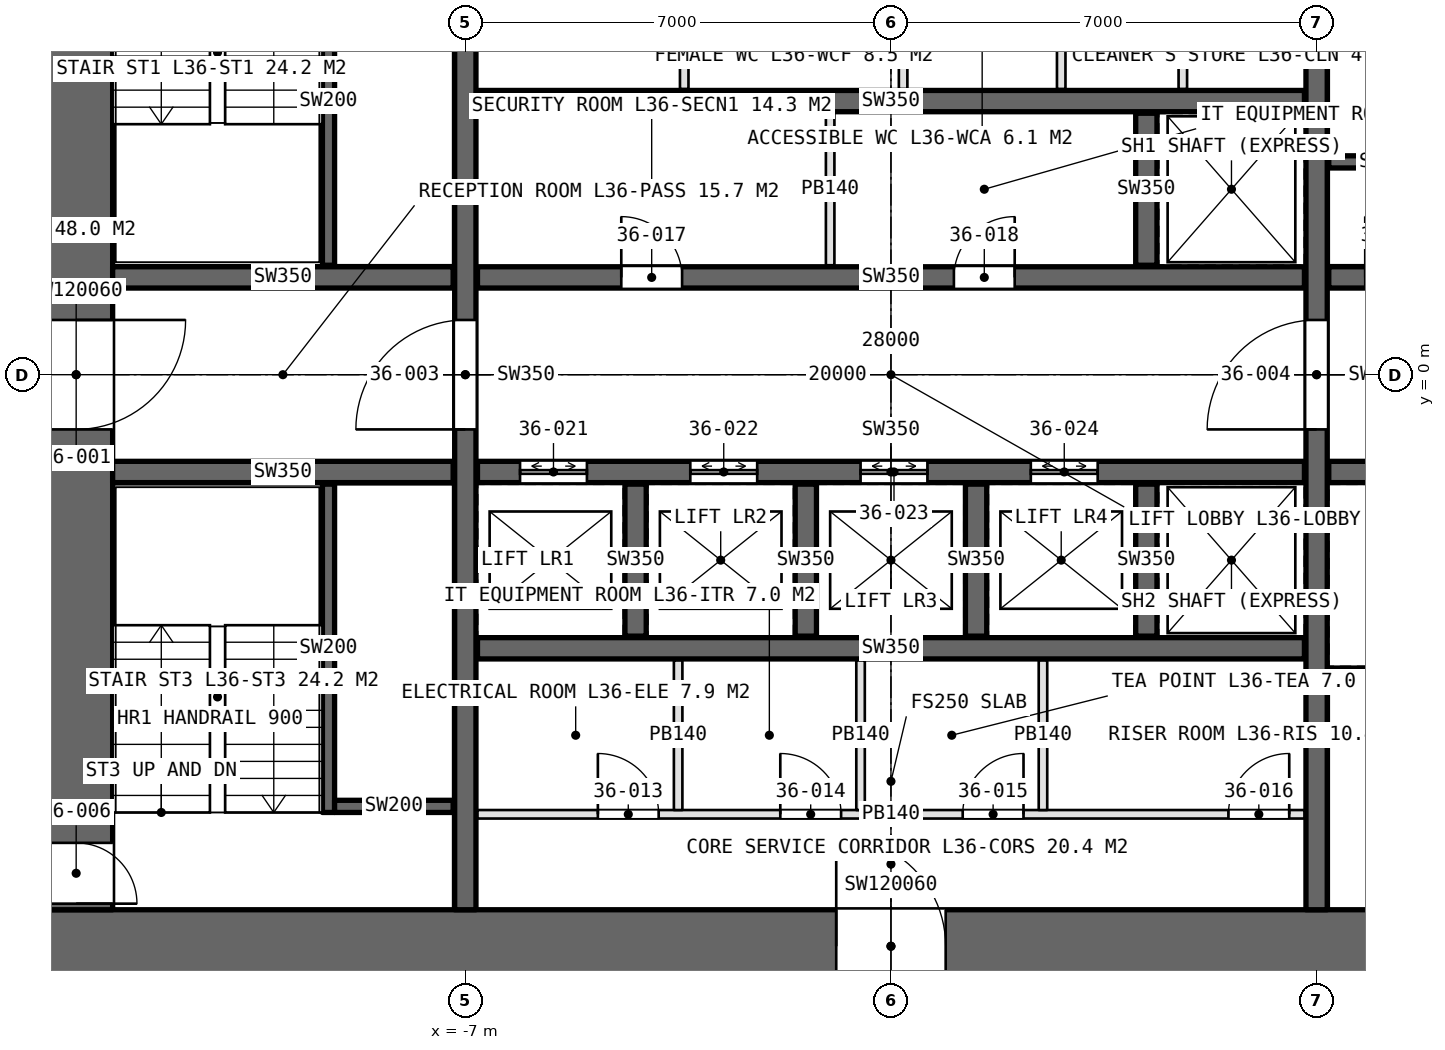
"""IFC4 building model, lengths in metres.
Left out: names, types, materials, properties, quantities, classifications, styles, units other than length and angle.
Written with IfcOpenShell. Run it as: python <this file> out.ifc"""

import sys

from ifc_helpers import new_model, si_unit, direction, frame, frame_2d, origin, place, context, subcontext, project, spatial, rectangle, extrude, element, fill, save


model = new_model("IFC4")
c1 = context("Model", 3, precision=1e-05, world=origin(), true_north=direction((0.0, 1.0)))
c2 = subcontext(c1, "Body", "Model", "MODEL_VIEW")
j1 = project(units=[si_unit("LENGTHUNIT", "METRE"), si_unit("PLANEANGLEUNIT", "RADIAN")], contexts=[c1])
p1 = place(None, origin())
s1 = spatial("IfcSite", under=j1, at=p1, CompositionType="ELEMENT")
p2 = place(p1, origin())
s2 = spatial("IfcBuilding", under=s1, at=p2, CompositionType="ELEMENT")
p3 = place(p2, frame((0.0, 0.0, 168.0)))
s3 = spatial("IfcBuildingStorey", under=s2, at=p3, CompositionType="ELEMENT", Elevation=168.0)
p4 = place(p3, frame((-14.0, -9.4, 0.0), z_axis=(0.0, 0.0, 1.0), x_axis=(1.0, 0.0, 0.0)))
e1 = element("IfcWall", 1, at=p4, inside=s3, PredefinedType="SHEAR", context=c2, shape_type="SweptSolid", body=[
    extrude(rectangle(XDim=28.0, YDim=1.2, at=frame_2d((14.0, 0.0))), origin(), (0.0, 0.0, 1.0), 4.2),
])
p5 = place(p4, frame((13.1, 0.0, 0.0)))
e2 = element("IfcOpeningElement", 2, at=p5, cuts=e1, PredefinedType="OPENING", context=c2, shape_type="SweptSolid", body=[
    extrude(rectangle(XDim=1.8, YDim=2.4, at=frame_2d((0.9, 1.2))), frame((0.0, 0.61, 0.0), z_axis=(0.0, -1.0, 0.0), x_axis=(1.0, 0.0, 0.0)), (0.0, 0.0, 1.0), 1.22),
])
p6 = place(p4, frame((22.9, 0.0, 0.0)))
e3 = element("IfcOpeningElement", 3, at=p6, cuts=e1, PredefinedType="OPENING", context=c2, shape_type="SweptSolid", body=[
    extrude(rectangle(XDim=2.2, YDim=2.7, at=frame_2d((1.1, 1.35))), frame((0.0, 0.61, 0.0), z_axis=(0.0, -1.0, 0.0), x_axis=(1.0, 0.0, 0.0)), (0.0, 0.0, 1.0), 1.22),
])
p7 = place(p3, frame((-13.4, 8.8, 0.0), z_axis=(0.0, 0.0, 1.0), x_axis=(0.0, -1.0, 0.0)))
e4 = element("IfcWall", 4, at=p7, inside=s3, PredefinedType="SHEAR", context=c2, shape_type="SweptSolid", body=[
    extrude(rectangle(XDim=17.6, YDim=1.2, at=frame_2d((8.8, 0.0))), origin(), (0.0, 0.0, 1.0), 4.2),
])
p8 = place(p7, frame((7.9, 0.0, 0.0)))
e5 = element("IfcOpeningElement", 5, at=p8, cuts=e4, PredefinedType="OPENING", context=c2, shape_type="SweptSolid", body=[
    extrude(rectangle(XDim=1.8, YDim=2.4, at=frame_2d((0.9, 1.2))), frame((0.0, 0.61, 0.0), z_axis=(0.0, -1.0, 0.0), x_axis=(1.0, 0.0, 0.0)), (0.0, 0.0, 1.0), 1.22),
])
p9 = place(p7, frame((16.5, 0.0, 0.0)))
e6 = element("IfcOpeningElement", 6, at=p9, cuts=e4, PredefinedType="OPENING", context=c2, shape_type="SweptSolid", body=[
    extrude(rectangle(XDim=1.0, YDim=2.4, at=frame_2d((0.5, 1.2))), frame((0.0, 0.61, 0.0), z_axis=(0.0, -1.0, 0.0), x_axis=(1.0, 0.0, 0.0)), (0.0, 0.0, 1.0), 1.22),
])
p10 = place(p3, frame((-7.0, -8.8, 0.0), z_axis=(0.0, 0.0, 1.0), x_axis=(0.0, 1.0, 0.0)))
e7 = element("IfcWall", 7, at=p10, inside=s3, PredefinedType="SHEAR", context=c2, shape_type="SweptSolid", body=[
    extrude(rectangle(XDim=17.6, YDim=0.35, at=frame_2d((8.8, 0.0))), origin(), (0.0, 0.0, 1.0), 4.2),
])
p11 = place(p10, frame((7.9, 0.0, 0.0)))
e8 = element("IfcOpeningElement", 8, at=p11, cuts=e7, PredefinedType="OPENING", context=c2, shape_type="SweptSolid", body=[
    extrude(rectangle(XDim=1.8, YDim=2.4, at=frame_2d((0.9, 1.2))), frame((0.0, 0.185, 0.0), z_axis=(0.0, -1.0, 0.0), x_axis=(1.0, 0.0, 0.0)), (0.0, 0.0, 1.0), 0.37),
])
p12 = place(p3, frame((7.0, -8.8, 0.0), z_axis=(0.0, 0.0, 1.0), x_axis=(0.0, 1.0, 0.0)))
e9 = element("IfcWall", 9, at=p12, inside=s3, PredefinedType="SHEAR", context=c2, shape_type="SweptSolid", body=[
    extrude(rectangle(XDim=17.6, YDim=0.35, at=frame_2d((8.8, 0.0))), origin(), (0.0, 0.0, 1.0), 4.2),
])
p13 = place(p12, frame((7.9, 0.0, 0.0)))
e10 = element("IfcOpeningElement", 10, at=p13, cuts=e9, PredefinedType="OPENING", context=c2, shape_type="SweptSolid", body=[
    extrude(rectangle(XDim=1.8, YDim=2.4, at=frame_2d((0.9, 1.2))), frame((0.0, 0.185, 0.0), z_axis=(0.0, -1.0, 0.0), x_axis=(1.0, 0.0, 0.0)), (0.0, 0.0, 1.0), 0.37),
])
p14 = place(p3, frame((-6.8, 1.6, 0.0), z_axis=(0.0, 0.0, 1.0), x_axis=(1.0, 0.0, 0.0)))
e11 = element("IfcWall", 11, at=p14, inside=s3, PredefinedType="SHEAR", context=c2, shape_type="SweptSolid", body=[
    extrude(rectangle(XDim=13.6, YDim=0.35, at=frame_2d((6.8, 0.0))), origin(), (0.0, 0.0, 1.0), 4.2),
])
p15 = place(p14, frame((2.365, 0.0, 0.0)))
e12 = element("IfcOpeningElement", 12, at=p15, cuts=e11, PredefinedType="OPENING", context=c2, shape_type="SweptSolid", body=[
    extrude(rectangle(XDim=1.0, YDim=2.4, at=frame_2d((0.5, 1.2))), frame((0.0, 0.185, 0.0), z_axis=(0.0, -1.0, 0.0), x_axis=(1.0, 0.0, 0.0)), (0.0, 0.0, 1.0), 0.37),
])
p16 = place(p14, frame((7.835, 0.0, 0.0)))
e13 = element("IfcOpeningElement", 13, at=p16, cuts=e11, PredefinedType="OPENING", context=c2, shape_type="SweptSolid", body=[
    extrude(rectangle(XDim=1.0, YDim=2.4, at=frame_2d((0.5, 1.2))), frame((0.0, 0.185, 0.0), z_axis=(0.0, -1.0, 0.0), x_axis=(1.0, 0.0, 0.0)), (0.0, 0.0, 1.0), 0.37),
])
p17 = place(p3, frame((-6.8, -1.6, 0.0), z_axis=(0.0, 0.0, 1.0), x_axis=(1.0, 0.0, 0.0)))
e14 = element("IfcWall", 14, at=p17, inside=s3, PredefinedType="SHEAR", context=c2, shape_type="SweptSolid", body=[
    extrude(rectangle(XDim=13.6, YDim=0.35, at=frame_2d((6.8, 0.0))), origin(), (0.0, 0.0, 1.0), 4.2),
])
p18 = place(p17, frame((0.7, 0.0, 0.0)))
e15 = element("IfcOpeningElement", 15, at=p18, cuts=e14, PredefinedType="OPENING", context=c2, shape_type="SweptSolid", body=[
    extrude(rectangle(XDim=1.1, YDim=2.4, at=frame_2d((0.55, 1.2))), frame((0.0, 0.185, 0.0), z_axis=(0.0, -1.0, 0.0), x_axis=(1.0, 0.0, 0.0)), (0.0, 0.0, 1.0), 0.37),
])
p19 = place(p17, frame((3.5, 0.0, 0.0)))
e16 = element("IfcOpeningElement", 16, at=p19, cuts=e14, PredefinedType="OPENING", context=c2, shape_type="SweptSolid", body=[
    extrude(rectangle(XDim=1.1, YDim=2.4, at=frame_2d((0.55, 1.2))), frame((0.0, 0.185, 0.0), z_axis=(0.0, -1.0, 0.0), x_axis=(1.0, 0.0, 0.0)), (0.0, 0.0, 1.0), 0.37),
])
p20 = place(p17, frame((6.3, 0.0, 0.0)))
e17 = element("IfcOpeningElement", 17, at=p20, cuts=e14, PredefinedType="OPENING", context=c2, shape_type="SweptSolid", body=[
    extrude(rectangle(XDim=1.1, YDim=2.4, at=frame_2d((0.55, 1.2))), frame((0.0, 0.185, 0.0), z_axis=(0.0, -1.0, 0.0), x_axis=(1.0, 0.0, 0.0)), (0.0, 0.0, 1.0), 0.37),
])
p21 = place(p17, frame((9.1, 0.0, 0.0)))
e18 = element("IfcOpeningElement", 18, at=p21, cuts=e14, PredefinedType="OPENING", context=c2, shape_type="SweptSolid", body=[
    extrude(rectangle(XDim=1.1, YDim=2.4, at=frame_2d((0.55, 1.2))), frame((0.0, 0.185, 0.0), z_axis=(0.0, -1.0, 0.0), x_axis=(1.0, 0.0, 0.0)), (0.0, 0.0, 1.0), 0.37),
])
for number, where, z_axis, x_axis in (
    (19, (-6.8, 4.5, 0.0), (0.0, 0.0, 1.0), (1.0, 0.0, 0.0)),
    (20, (-6.8, -4.5, 0.0), (0.0, 0.0, 1.0), (1.0, 0.0, 0.0)),
):
    element("IfcWall", number, at=place(p3, frame(where, z_axis=z_axis, x_axis=x_axis)), inside=s3, PredefinedType="SHEAR", context=c2, shape_type="SweptSolid", body=[
        extrude(rectangle(XDim=13.6, YDim=0.35, at=frame_2d((6.8, 0.0))), origin(), (0.0, 0.0, 1.0), 4.2),
    ])
for number, where, z_axis, x_axis in (
    (21, (-12.8, 1.6, 0.0), (0.0, 0.0, 1.0), (1.0, 0.0, 0.0)),
    (22, (-12.8, -1.6, 0.0), (0.0, 0.0, 1.0), (1.0, 0.0, 0.0)),
):
    element("IfcWall", number, at=place(p3, frame(where, z_axis=z_axis, x_axis=x_axis)), inside=s3, PredefinedType="SHEAR", context=c2, shape_type="SweptSolid", body=[
        extrude(rectangle(XDim=5.6, YDim=0.35, at=frame_2d((2.8, 0.0))), origin(), (0.0, 0.0, 1.0), 4.2),
    ])
p22 = place(p3, frame((7.2, 1.6, 0.0), z_axis=(0.0, 0.0, 1.0), x_axis=(1.0, 0.0, 0.0)))
e23 = element("IfcWall", 23, at=p22, inside=s3, PredefinedType="SHEAR", context=c2, shape_type="SweptSolid", body=[
    extrude(rectangle(XDim=5.6, YDim=0.35, at=frame_2d((2.8, 0.0))), origin(), (0.0, 0.0, 1.0), 4.2),
])
p23 = place(p22, frame((0.6, 0.0, 0.0)))
e24 = element("IfcOpeningElement", 24, at=p23, cuts=e23, PredefinedType="OPENING", context=c2, shape_type="SweptSolid", body=[
    extrude(rectangle(XDim=1.0, YDim=2.4, at=frame_2d((0.5, 1.2))), frame((0.0, 0.185, 0.0), z_axis=(0.0, -1.0, 0.0), x_axis=(1.0, 0.0, 0.0)), (0.0, 0.0, 1.0), 0.37),
])
p24 = place(p3, frame((7.2, -1.6, 0.0), z_axis=(0.0, 0.0, 1.0), x_axis=(1.0, 0.0, 0.0)))
e25 = element("IfcWall", 25, at=p24, inside=s3, PredefinedType="SHEAR", context=c2, shape_type="SweptSolid", body=[
    extrude(rectangle(XDim=5.6, YDim=0.35, at=frame_2d((2.8, 0.0))), origin(), (0.0, 0.0, 1.0), 4.2),
])
p25 = place(p24, frame((0.9, 0.0, 0.0)))
e26 = element("IfcOpeningElement", 26, at=p25, cuts=e25, PredefinedType="OPENING", context=c2, shape_type="SweptSolid", body=[
    extrude(rectangle(XDim=1.3, YDim=2.4, at=frame_2d((0.65, 1.2))), frame((0.0, 0.185, 0.0), z_axis=(0.0, -1.0, 0.0), x_axis=(1.0, 0.0, 0.0)), (0.0, 0.0, 1.0), 0.37),
])
p26 = place(p24, frame((3.9, 0.0, 0.0)))
e27 = element("IfcOpeningElement", 27, at=p26, cuts=e25, PredefinedType="OPENING", context=c2, shape_type="SweptSolid", body=[
    extrude(rectangle(XDim=1.3, YDim=2.4, at=frame_2d((0.65, 1.2))), frame((0.0, 0.185, 0.0), z_axis=(0.0, -1.0, 0.0), x_axis=(1.0, 0.0, 0.0)), (0.0, 0.0, 1.0), 0.37),
])
p27 = place(p3, frame((7.2, -5.0, 0.0), z_axis=(0.0, 0.0, 1.0), x_axis=(1.0, 0.0, 0.0)))
e28 = element("IfcWall", 28, at=p27, inside=s3, PredefinedType="SHEAR", context=c2, shape_type="SweptSolid", body=[
    extrude(rectangle(XDim=5.6, YDim=0.35, at=frame_2d((2.8, 0.0))), origin(), (0.0, 0.0, 1.0), 4.2),
])
for number, where, z_axis, x_axis in (
    (29, (-4.2, -4.3, 0.0), (0.0, 0.0, 1.0), (0.0, 1.0, 0.0)),
    (30, (-1.4, -4.3, 0.0), (0.0, 0.0, 1.0), (0.0, 1.0, 0.0)),
    (31, (1.4, -4.3, 0.0), (0.0, 0.0, 1.0), (0.0, 1.0, 0.0)),
    (32, (4.2, 1.8, 0.0), (0.0, 0.0, 1.0), (0.0, 1.0, 0.0)),
    (33, (4.2, -4.3, 0.0), (0.0, 0.0, 1.0), (0.0, 1.0, 0.0)),
):
    element("IfcWall", number, at=place(p3, frame(where, z_axis=z_axis, x_axis=x_axis)), inside=s3, PredefinedType="SHEAR", context=c2, shape_type="SweptSolid", body=[
        extrude(rectangle(XDim=2.5, YDim=0.35, at=frame_2d((1.25, 0.0))), origin(), (0.0, 0.0, 1.0), 4.2),
    ])
for number, where, z_axis, x_axis in (
    (34, (-3.4, 4.7, 0.0), (0.0, 0.0, 1.0), (0.0, 1.0, 0.0)),
    (35, (0.2, 4.7, 0.0), (0.0, 0.0, 1.0), (0.0, 1.0, 0.0)),
    (36, (2.8, 4.7, 0.0), (0.0, 0.0, 1.0), (0.0, 1.0, 0.0)),
    (37, (4.8, 4.7, 0.0), (0.0, 0.0, 1.0), (0.0, 1.0, 0.0)),
):
    element("IfcWall", number, at=place(p3, frame(where, z_axis=z_axis, x_axis=x_axis)), inside=s3, PredefinedType="PARTITIONING", context=c2, shape_type="SweptSolid", body=[
        extrude(rectangle(XDim=2.46, YDim=0.14, at=frame_2d((1.23, 0.0))), origin(), (0.0, 0.0, 1.0), 3.95),
    ])
p28 = place(p3, frame((-6.8, -7.23, 0.0), z_axis=(0.0, 0.0, 1.0), x_axis=(1.0, 0.0, 0.0)))
e38 = element("IfcWall", 38, at=p28, inside=s3, PredefinedType="PARTITIONING", context=c2, shape_type="SweptSolid", body=[
    extrude(rectangle(XDim=13.6, YDim=0.14, at=frame_2d((6.8, 0.0))), origin(), (0.0, 0.0, 1.0), 3.95),
])
p29 = place(p28, frame((1.98, 0.0, 0.0)))
e39 = element("IfcOpeningElement", 39, at=p29, cuts=e38, PredefinedType="OPENING", context=c2, shape_type="SweptSolid", body=[
    extrude(rectangle(XDim=1.0, YDim=2.4, at=frame_2d((0.5, 1.2))), frame((0.0, 0.08, 0.0), z_axis=(0.0, -1.0, 0.0), x_axis=(1.0, 0.0, 0.0)), (0.0, 0.0, 1.0), 0.16),
])
p30 = place(p28, frame((4.98, 0.0, 0.0)))
e40 = element("IfcOpeningElement", 40, at=p30, cuts=e38, PredefinedType="OPENING", context=c2, shape_type="SweptSolid", body=[
    extrude(rectangle(XDim=1.0, YDim=2.4, at=frame_2d((0.5, 1.2))), frame((0.0, 0.08, 0.0), z_axis=(0.0, -1.0, 0.0), x_axis=(1.0, 0.0, 0.0)), (0.0, 0.0, 1.0), 0.16),
])
p31 = place(p28, frame((7.98, 0.0, 0.0)))
e41 = element("IfcOpeningElement", 41, at=p31, cuts=e38, PredefinedType="OPENING", context=c2, shape_type="SweptSolid", body=[
    extrude(rectangle(XDim=1.0, YDim=2.4, at=frame_2d((0.5, 1.2))), frame((0.0, 0.08, 0.0), z_axis=(0.0, -1.0, 0.0), x_axis=(1.0, 0.0, 0.0)), (0.0, 0.0, 1.0), 0.16),
])
p32 = place(p28, frame((12.35, 0.0, 0.0)))
e42 = element("IfcOpeningElement", 42, at=p32, cuts=e38, PredefinedType="OPENING", context=c2, shape_type="SweptSolid", body=[
    extrude(rectangle(XDim=1.0, YDim=2.4, at=frame_2d((0.5, 1.2))), frame((0.0, 0.08, 0.0), z_axis=(0.0, -1.0, 0.0), x_axis=(1.0, 0.0, 0.0)), (0.0, 0.0, 1.0), 0.16),
])
for number, where, z_axis, x_axis in (
    (43, (-3.5, -4.7, 0.0), (0.0, 0.0, 1.0), (0.0, -1.0, 0.0)),
    (44, (-0.5, -4.7, 0.0), (0.0, 0.0, 1.0), (0.0, -1.0, 0.0)),
    (45, (2.5, -4.7, 0.0), (0.0, 0.0, 1.0), (0.0, -1.0, 0.0)),
):
    element("IfcWall", number, at=place(p3, frame(where, z_axis=z_axis, x_axis=x_axis)), inside=s3, PredefinedType="PARTITIONING", context=c2, shape_type="SweptSolid", body=[
        extrude(rectangle(XDim=2.46, YDim=0.14, at=frame_2d((1.23, 0.0))), origin(), (0.0, 0.0, 1.0), 3.95),
    ])
p33 = place(p3, frame((-1.0, 1.8, 0.0), z_axis=(0.0, 0.0, 1.0), x_axis=(0.0, 1.0, 0.0)))
e46 = element("IfcWall", 46, at=p33, inside=s3, PredefinedType="PARTITIONING", context=c2, shape_type="SweptSolid", body=[
    extrude(rectangle(XDim=2.5, YDim=0.14, at=frame_2d((1.25, 0.0))), origin(), (0.0, 0.0, 1.0), 3.95),
])
for number, where, z_axis, x_axis in (
    (47, (-9.25, 7.2, 0.0), (0.0, 0.0, 1.0), (0.0, -1.0, 0.0)),
    (48, (-9.25, -7.2, 0.0), (0.0, 0.0, 1.0), (0.0, 1.0, 0.0)),
):
    element("IfcWall", number, at=place(p3, frame(where, z_axis=z_axis, x_axis=x_axis)), inside=s3, PredefinedType="SOLIDWALL", context=c2, shape_type="SweptSolid", body=[
        extrude(rectangle(XDim=5.4, YDim=0.2, at=frame_2d((2.7, 0.0))), origin(), (0.0, 0.0, 1.0), 4.2),
    ])
for number, where, z_axis, x_axis in (
    (49, (-9.15, -7.1, 0.0), (0.0, 0.0, 1.0), (1.0, 0.0, 0.0)),
    (50, (9.15, 3.5, 0.0), (0.0, 0.0, 1.0), (-1.0, 0.0, 0.0)),
):
    element("IfcWall", number, at=place(p3, frame(where, z_axis=z_axis, x_axis=x_axis)), inside=s3, PredefinedType="SOLIDWALL", context=c2, shape_type="SweptSolid", body=[
        extrude(rectangle(XDim=1.95, YDim=0.2, at=frame_2d((0.975, 0.0))), origin(), (0.0, 0.0, 1.0), 4.2),
    ])
p34 = place(p8, origin())
e51 = element("IfcDoor", 51, at=p34, inside=s3, OperationType="DOUBLE_DOOR_SINGLE_SWING", PredefinedType="DOOR", context=c2, shape_type="SweptSolid", body=[
    extrude(rectangle(XDim=1.8, YDim=2.4, at=frame_2d((0.9, 1.2))), frame((0.0, 0.025, 0.0), z_axis=(0.0, -1.0, 0.0), x_axis=(1.0, 0.0, 0.0)), (0.0, 0.0, 1.0), 0.05),
])
fill(e5, e51)
p35 = place(p11, origin())
e52 = element("IfcDoor", 52, at=p35, inside=s3, OperationType="DOUBLE_DOOR_SINGLE_SWING", PredefinedType="DOOR", context=c2, shape_type="SweptSolid", body=[
    extrude(rectangle(XDim=1.8, YDim=2.4, at=frame_2d((0.9, 1.2))), frame((0.0, 0.025, 0.0), z_axis=(0.0, -1.0, 0.0), x_axis=(1.0, 0.0, 0.0)), (0.0, 0.0, 1.0), 0.05),
])
fill(e8, e52)
p36 = place(p13, origin())
e53 = element("IfcDoor", 53, at=p36, inside=s3, OperationType="DOUBLE_DOOR_SINGLE_SWING", PredefinedType="DOOR", context=c2, shape_type="SweptSolid", body=[
    extrude(rectangle(XDim=1.8, YDim=2.4, at=frame_2d((0.9, 1.2))), frame((0.0, 0.025, 0.0), z_axis=(0.0, -1.0, 0.0), x_axis=(1.0, 0.0, 0.0)), (0.0, 0.0, 1.0), 0.05),
])
fill(e10, e53)
p37 = place(p9, origin())
e54 = element("IfcDoor", 54, at=p37, inside=s3, OperationType="SINGLE_SWING_RIGHT", PredefinedType="DOOR", context=c2, shape_type="SweptSolid", body=[
    extrude(rectangle(XDim=1.0, YDim=2.4, at=frame_2d((0.5, 1.2))), frame((0.0, 0.025, 0.0), z_axis=(0.0, -1.0, 0.0), x_axis=(1.0, 0.0, 0.0)), (0.0, 0.0, 1.0), 0.05),
])
fill(e6, e54)
p38 = place(p29, origin())
e55 = element("IfcDoor", 55, at=p38, inside=s3, OperationType="SINGLE_SWING_LEFT", PredefinedType="DOOR", context=c2, shape_type="SweptSolid", body=[
    extrude(rectangle(XDim=1.0, YDim=2.4, at=frame_2d((0.5, 1.2))), frame((0.0, 0.025, 0.0), z_axis=(0.0, -1.0, 0.0), x_axis=(1.0, 0.0, 0.0)), (0.0, 0.0, 1.0), 0.05),
])
fill(e39, e55)
p39 = place(p30, origin())
e56 = element("IfcDoor", 56, at=p39, inside=s3, OperationType="SINGLE_SWING_LEFT", PredefinedType="DOOR", context=c2, shape_type="SweptSolid", body=[
    extrude(rectangle(XDim=1.0, YDim=2.4, at=frame_2d((0.5, 1.2))), frame((0.0, 0.025, 0.0), z_axis=(0.0, -1.0, 0.0), x_axis=(1.0, 0.0, 0.0)), (0.0, 0.0, 1.0), 0.05),
])
fill(e40, e56)
p40 = place(p31, origin())
e57 = element("IfcDoor", 57, at=p40, inside=s3, OperationType="SINGLE_SWING_RIGHT", PredefinedType="DOOR", context=c2, shape_type="SweptSolid", body=[
    extrude(rectangle(XDim=1.0, YDim=2.4, at=frame_2d((0.5, 1.2))), frame((0.0, 0.025, 0.0), z_axis=(0.0, -1.0, 0.0), x_axis=(1.0, 0.0, 0.0)), (0.0, 0.0, 1.0), 0.05),
])
fill(e41, e57)
p41 = place(p32, origin())
e58 = element("IfcDoor", 58, at=p41, inside=s3, OperationType="SINGLE_SWING_RIGHT", PredefinedType="DOOR", context=c2, shape_type="SweptSolid", body=[
    extrude(rectangle(XDim=1.0, YDim=2.4, at=frame_2d((0.5, 1.2))), frame((0.0, 0.025, 0.0), z_axis=(0.0, -1.0, 0.0), x_axis=(1.0, 0.0, 0.0)), (0.0, 0.0, 1.0), 0.05),
])
fill(e42, e58)
p42 = place(p15, origin())
e59 = element("IfcDoor", 59, at=p42, inside=s3, OperationType="SINGLE_SWING_LEFT", PredefinedType="DOOR", context=c2, shape_type="SweptSolid", body=[
    extrude(rectangle(XDim=1.0, YDim=2.4, at=frame_2d((0.5, 1.2))), frame((0.0, 0.025, 0.0), z_axis=(0.0, -1.0, 0.0), x_axis=(1.0, 0.0, 0.0)), (0.0, 0.0, 1.0), 0.05),
])
fill(e12, e59)
p43 = place(p16, origin())
e60 = element("IfcDoor", 60, at=p43, inside=s3, OperationType="SINGLE_SWING_RIGHT", PredefinedType="DOOR", context=c2, shape_type="SweptSolid", body=[
    extrude(rectangle(XDim=1.0, YDim=2.4, at=frame_2d((0.5, 1.2))), frame((0.0, 0.025, 0.0), z_axis=(0.0, -1.0, 0.0), x_axis=(1.0, 0.0, 0.0)), (0.0, 0.0, 1.0), 0.05),
])
fill(e13, e60)
p44 = place(p5, origin())
e61 = element("IfcDoor", 61, at=p44, inside=s3, OperationType="DOUBLE_DOOR_SINGLE_SWING", PredefinedType="DOOR", context=c2, shape_type="SweptSolid", body=[
    extrude(rectangle(XDim=1.8, YDim=2.4, at=frame_2d((0.9, 1.2))), frame((0.0, 0.025, 0.0), z_axis=(0.0, -1.0, 0.0), x_axis=(1.0, 0.0, 0.0)), (0.0, 0.0, 1.0), 0.05),
])
fill(e2, e61)
p45 = place(p18, origin())
e62 = element("IfcDoor", 62, at=p45, inside=s3, OperationType="DOUBLE_DOOR_SLIDING", PredefinedType="DOOR", context=c2, shape_type="SweptSolid", body=[
    extrude(rectangle(XDim=1.1, YDim=2.4, at=frame_2d((0.55, 1.2))), frame((0.0, 0.025, 0.0), z_axis=(0.0, -1.0, 0.0), x_axis=(1.0, 0.0, 0.0)), (0.0, 0.0, 1.0), 0.05),
])
fill(e15, e62)
p46 = place(p19, origin())
e63 = element("IfcDoor", 63, at=p46, inside=s3, OperationType="DOUBLE_DOOR_SLIDING", PredefinedType="DOOR", context=c2, shape_type="SweptSolid", body=[
    extrude(rectangle(XDim=1.1, YDim=2.4, at=frame_2d((0.55, 1.2))), frame((0.0, 0.025, 0.0), z_axis=(0.0, -1.0, 0.0), x_axis=(1.0, 0.0, 0.0)), (0.0, 0.0, 1.0), 0.05),
])
fill(e16, e63)
p47 = place(p20, origin())
e64 = element("IfcDoor", 64, at=p47, inside=s3, OperationType="DOUBLE_DOOR_SLIDING", PredefinedType="DOOR", context=c2, shape_type="SweptSolid", body=[
    extrude(rectangle(XDim=1.1, YDim=2.4, at=frame_2d((0.55, 1.2))), frame((0.0, 0.025, 0.0), z_axis=(0.0, -1.0, 0.0), x_axis=(1.0, 0.0, 0.0)), (0.0, 0.0, 1.0), 0.05),
])
fill(e17, e64)
p48 = place(p21, origin())
e65 = element("IfcDoor", 65, at=p48, inside=s3, OperationType="DOUBLE_DOOR_SLIDING", PredefinedType="DOOR", context=c2, shape_type="SweptSolid", body=[
    extrude(rectangle(XDim=1.1, YDim=2.4, at=frame_2d((0.55, 1.2))), frame((0.0, 0.025, 0.0), z_axis=(0.0, -1.0, 0.0), x_axis=(1.0, 0.0, 0.0)), (0.0, 0.0, 1.0), 0.05),
])
fill(e18, e65)
save(model, sys.argv[1])
